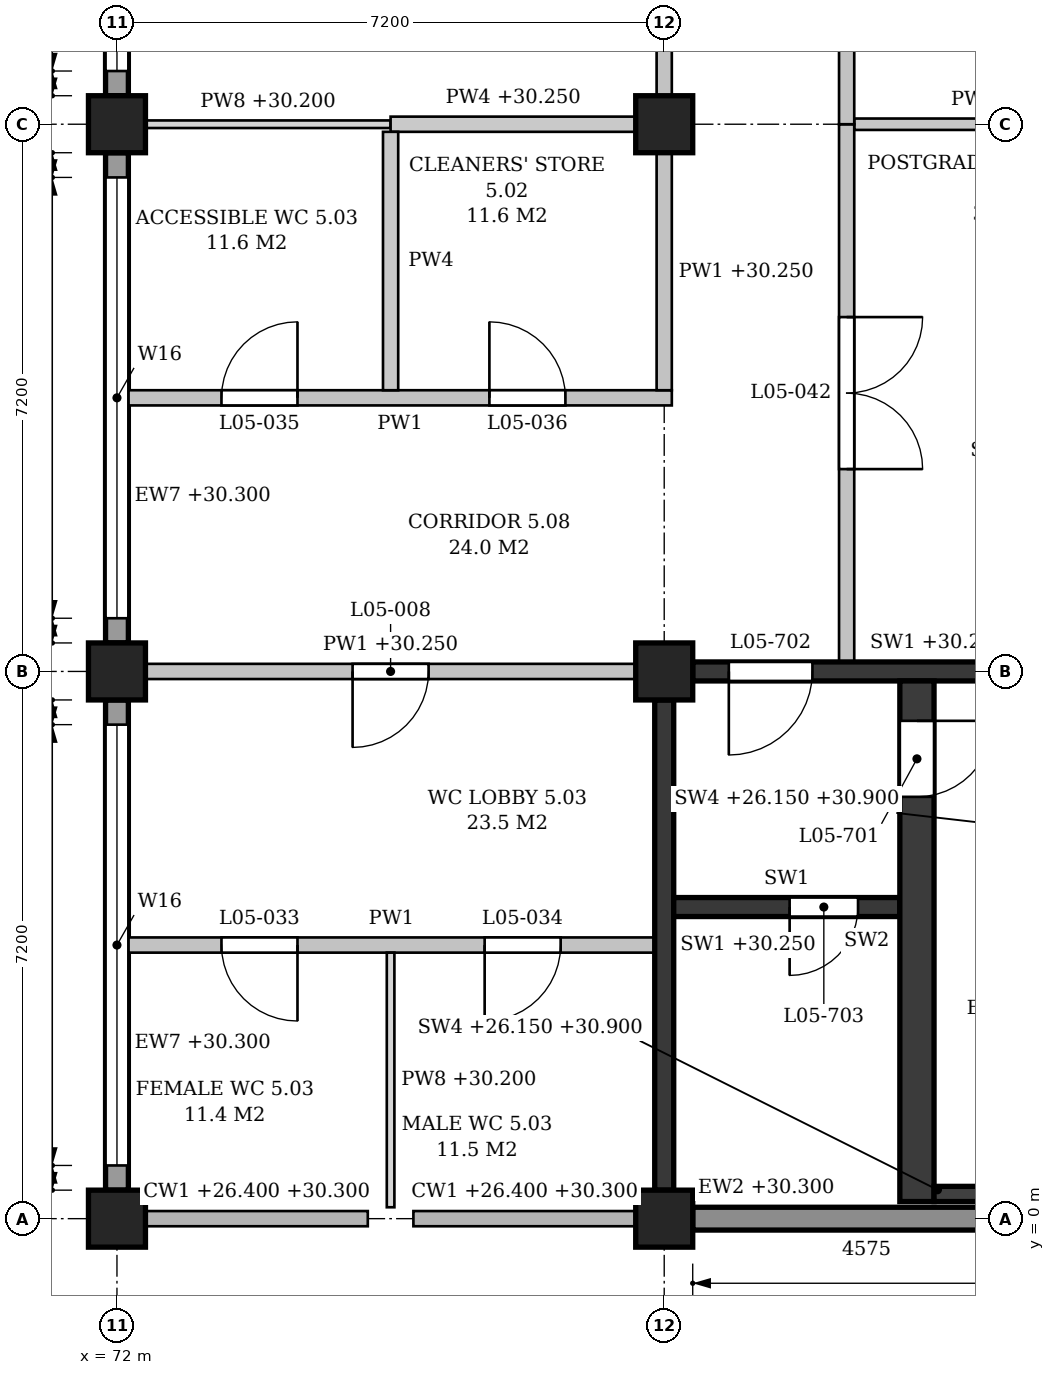
"""IFC4 building model, lengths in metres.
Left out: names, types, materials, properties, quantities, classifications, styles, units other than length and angle.
Written with IfcOpenShell. Run it as: python <this file> out.ifc"""

import sys

from ifc_helpers import new_model, si_unit, direction, frame, frame_2d, origin, origin_2d, place, context, subcontext, project, spatial, polyline, rectangle, outline, extrude, element, fill, save


model = new_model("IFC4")
c1 = context("Model", 3, precision=1e-05, world=origin(), true_north=direction((0.0, 1.0)))
c2 = subcontext(c1, "Body", "Model", "MODEL_VIEW")
j1 = project(units=[si_unit("LENGTHUNIT", "METRE"), si_unit("PLANEANGLEUNIT", "RADIAN")], contexts=[c1])
p1 = place(None, origin())
s1 = spatial("IfcSite", under=j1, at=p1, CompositionType="ELEMENT")
p2 = place(p1, origin())
s2 = spatial("IfcBuilding", under=s1, at=p2, CompositionType="ELEMENT")
p3 = place(p2, frame((0.0, 0.0, 26.4)))
s3 = spatial("IfcBuildingStorey", under=s2, at=p3, CompositionType="ELEMENT", Elevation=26.4)
for number, where, z_axis, x_axis in (
    (1, (72.0, 0.0, 0.0), (0.0, 0.0, 1.0), (1.0, 0.0, 0.0)),
    (2, (72.0, 7.2, 0.0), (0.0, 0.0, 1.0), (1.0, 0.0, 0.0)),
    (3, (72.0, 14.4, 0.0), (0.0, 0.0, 1.0), (1.0, 0.0, 0.0)),
    (4, (79.2, 0.0, 0.0), (0.0, 0.0, 1.0), (1.0, 0.0, 0.0)),
    (5, (79.2, 7.2, 0.0), (0.0, 0.0, 1.0), (1.0, 0.0, 0.0)),
    (6, (79.2, 14.4, 0.0), (0.0, 0.0, 1.0), (1.0, 0.0, 0.0)),
):
    element("IfcColumn", number, at=place(p3, frame(where, z_axis=z_axis, x_axis=x_axis)), inside=s3, PredefinedType="COLUMN", context=c2, shape_type="SweptSolid", body=[
        extrude(rectangle(XDim=0.75, YDim=0.75, at=origin_2d()), origin(), (0.0, 0.0, 1.0), 4.8),
    ])
p4 = place(p3, frame((79.575, 0.0, 0.0), z_axis=(0.0, 0.0, 1.0), x_axis=(1.0, 0.0, 0.0)))
e7 = element("IfcWall", 7, at=p4, inside=s3, PredefinedType="STANDARD", context=c2, shape_type="SweptSolid", body=[
    extrude(rectangle(XDim=6.45, YDim=0.3, at=frame_2d((3.225, 0.0))), origin(), (0.0, 0.0, 1.0), 3.9),
])
p5 = place(p4, frame((4.575, 0.0, 0.9)))
e8 = element("IfcOpeningElement", 8, at=p5, cuts=e7, PredefinedType="OPENING", context=c2, shape_type="SweptSolid", body=[
    extrude(outline(polyline([(0.0, 0.0), (0.9, 0.0), (0.9, 2.05), (0.45, 2.5), (0.0, 2.05), (0.0, 0.0)])), frame((0.0, 0.16, 0.0), z_axis=(0.0, -1.0, 0.0), x_axis=(1.0, 0.0, 0.0)), (0.0, 0.0, 1.0), 0.32),
])
p6 = place(p3, frame((72.0, 0.375, 0.0), z_axis=(0.0, 0.0, 1.0), x_axis=(0.0, 1.0, 0.0)))
e9 = element("IfcWall", 9, at=p6, inside=s3, PredefinedType="STANDARD", context=c2, shape_type="SweptSolid", body=[
    extrude(rectangle(XDim=6.45, YDim=0.3, at=frame_2d((3.225, 0.0))), origin(), (0.0, 0.0, 1.0), 3.9),
])
p7 = place(p6, frame((0.325, 0.0, 1.5)))
e10 = element("IfcOpeningElement", 10, at=p7, cuts=e9, PredefinedType="OPENING", context=c2, shape_type="SweptSolid", body=[
    extrude(outline(polyline([(0.0, 0.0), (5.8, 0.0), (5.8, 0.4), (2.9, 1.9), (0.0, 0.4), (0.0, 0.0)])), frame((0.0, 0.16, 0.0), z_axis=(0.0, -1.0, 0.0), x_axis=(1.0, 0.0, 0.0)), (0.0, 0.0, 1.0), 0.32),
])
p8 = place(p3, frame((72.0, 7.575, 0.0), z_axis=(0.0, 0.0, 1.0), x_axis=(0.0, 1.0, 0.0)))
e11 = element("IfcWall", 11, at=p8, inside=s3, PredefinedType="STANDARD", context=c2, shape_type="SweptSolid", body=[
    extrude(rectangle(XDim=6.45, YDim=0.3, at=frame_2d((3.225, 0.0))), origin(), (0.0, 0.0, 1.0), 3.9),
])
p9 = place(p8, frame((0.325, 0.0, 1.5)))
e12 = element("IfcOpeningElement", 12, at=p9, cuts=e11, PredefinedType="OPENING", context=c2, shape_type="SweptSolid", body=[
    extrude(outline(polyline([(0.0, 0.0), (5.8, 0.0), (5.8, 0.4), (2.9, 1.9), (0.0, 0.4), (0.0, 0.0)])), frame((0.0, 0.16, 0.0), z_axis=(0.0, -1.0, 0.0), x_axis=(1.0, 0.0, 0.0)), (0.0, 0.0, 1.0), 0.32),
])
p10 = place(p3, frame((72.0, 14.775, 0.0), z_axis=(0.0, 0.0, 1.0), x_axis=(0.0, 1.0, 0.0)))
e13 = element("IfcWall", 13, at=p10, inside=s3, PredefinedType="STANDARD", context=c2, shape_type="SweptSolid", body=[
    extrude(rectangle(XDim=6.45, YDim=0.3, at=frame_2d((3.225, 0.0))), origin(), (0.0, 0.0, 1.0), 3.9),
])
p11 = place(p10, frame((0.325, 0.0, 1.5)))
e14 = element("IfcOpeningElement", 14, at=p11, cuts=e13, PredefinedType="OPENING", context=c2, shape_type="SweptSolid", body=[
    extrude(outline(polyline([(0.0, 0.0), (5.8, 0.0), (5.8, 0.4), (2.9, 1.9), (0.0, 0.4), (0.0, 0.0)])), frame((0.0, 0.16, 0.0), z_axis=(0.0, -1.0, 0.0), x_axis=(1.0, 0.0, 0.0)), (0.0, 0.0, 1.0), 0.32),
])
p12 = place(p3, frame((79.575, 7.2, 0.0), z_axis=(0.0, 0.0, 1.0), x_axis=(1.0, 0.0, 0.0)))
e15 = element("IfcWall", 15, at=p12, inside=s3, PredefinedType="SHEAR", context=c2, shape_type="SweptSolid", body=[
    extrude(rectangle(XDim=6.45, YDim=0.25, at=frame_2d((3.225, 0.0))), origin(), (0.0, 0.0, 1.0), 3.85),
])
p13 = place(p12, frame((0.475, 0.0, 0.0)))
e16 = element("IfcOpeningElement", 16, at=p13, cuts=e15, PredefinedType="OPENING", context=c2, shape_type="SweptSolid", body=[
    extrude(rectangle(XDim=1.1, YDim=2.1, at=frame_2d((0.55, 1.05))), frame((0.0, 0.135, 0.0), z_axis=(0.0, -1.0, 0.0), x_axis=(1.0, 0.0, 0.0)), (0.0, 0.0, 1.0), 0.27),
])
p14 = place(p3, frame((79.2, 0.375, 0.0), z_axis=(0.0, 0.0, 1.0), x_axis=(0.0, 1.0, 0.0)))
e17 = element("IfcWall", 17, at=p14, inside=s3, PredefinedType="SHEAR", context=c2, shape_type="SweptSolid", body=[
    extrude(rectangle(XDim=6.45, YDim=0.25, at=frame_2d((3.225, 0.0))), origin(), (0.0, 0.0, 1.0), 3.85),
])
p15 = place(p3, frame((82.75, 0.325, -0.25), z_axis=(0.0, 0.0, 1.0), x_axis=(1.0, 0.0, 0.0)))
e18 = element("IfcWall", 18, at=p15, inside=s3, PredefinedType="SHEAR", context=c2, shape_type="SweptSolid", body=[
    extrude(rectangle(XDim=1.4, YDim=0.2, at=frame_2d((0.7, 0.0))), origin(), (0.0, 0.0, 1.0), 4.75),
])
p16 = place(p3, frame((82.525, 0.225, 0.0), z_axis=(0.0, 0.0, 1.0), x_axis=(0.0, 1.0, 0.0)))
e19 = element("IfcWall", 19, at=p16, inside=s3, PredefinedType="SHEAR", context=c2, shape_type="SweptSolid", body=[
    extrude(rectangle(XDim=6.85, YDim=0.45, at=frame_2d((3.425, 0.0))), origin(), (0.0, 0.0, 1.0), 4.5),
])
p17 = place(p16, frame((5.325, 0.0, 0.0)))
e20 = element("IfcOpeningElement", 20, at=p17, cuts=e19, PredefinedType="OPENING", context=c2, shape_type="SweptSolid", body=[
    extrude(rectangle(XDim=1.0, YDim=2.1, at=frame_2d((0.5, 1.05))), frame((0.0, 0.235, 0.0), z_axis=(0.0, -1.0, 0.0), x_axis=(1.0, 0.0, 0.0)), (0.0, 0.0, 1.0), 0.47),
])
p18 = place(p3, frame((79.325, 4.1, 0.0), z_axis=(0.0, 0.0, 1.0), x_axis=(1.0, 0.0, 0.0)))
e21 = element("IfcWall", 21, at=p18, inside=s3, PredefinedType="SHEAR", context=c2, shape_type="SweptSolid", body=[
    extrude(rectangle(XDim=2.975, YDim=0.25, at=frame_2d((1.488, 0.0))), origin(), (0.0, 0.0, 1.0), 4.5),
])
p19 = place(p18, frame((1.525, 0.0, 0.0)))
e22 = element("IfcOpeningElement", 22, at=p19, cuts=e21, PredefinedType="OPENING", context=c2, shape_type="SweptSolid", body=[
    extrude(rectangle(XDim=0.9, YDim=2.1, at=frame_2d((0.45, 1.05))), frame((0.0, 0.135, 0.0), z_axis=(0.0, -1.0, 0.0), x_axis=(1.0, 0.0, 0.0)), (0.0, 0.0, 1.0), 0.27),
])
p20 = place(p3, frame((72.15, 3.6, 0.0), z_axis=(0.0, 0.0, 1.0), x_axis=(1.0, 0.0, 0.0)))
e23 = element("IfcWall", 23, at=p20, inside=s3, PredefinedType="PARTITIONING", context=c2, shape_type="SweptSolid", body=[
    extrude(outline(polyline([(0.0, 0.0), (6.925, 0.0), (6.925, 3.85), (6.825, 3.85), (6.825, 4.5), (0.05, 4.5), (0.05, 3.9), (0.0, 3.9), (0.0, 0.0)])), frame((0.0, 0.1, 0.0), z_axis=(0.0, -1.0, 0.0), x_axis=(1.0, 0.0, 0.0)), (0.0, 0.0, 1.0), 0.2),
])
p21 = place(p20, frame((1.225, 0.0, 0.0)))
e24 = element("IfcOpeningElement", 24, at=p21, cuts=e23, PredefinedType="OPENING", context=c2, shape_type="SweptSolid", body=[
    extrude(rectangle(XDim=1.0, YDim=2.1, at=frame_2d((0.5, 1.05))), frame((0.0, 0.11, 0.0), z_axis=(0.0, -1.0, 0.0), x_axis=(1.0, 0.0, 0.0)), (0.0, 0.0, 1.0), 0.22),
])
p22 = place(p20, frame((4.688, 0.0, 0.0)))
e25 = element("IfcOpeningElement", 25, at=p22, cuts=e23, PredefinedType="OPENING", context=c2, shape_type="SweptSolid", body=[
    extrude(rectangle(XDim=1.0, YDim=2.1, at=frame_2d((0.5, 1.05))), frame((0.0, 0.11, 0.0), z_axis=(0.0, -1.0, 0.0), x_axis=(1.0, 0.0, 0.0)), (0.0, 0.0, 1.0), 0.22),
])
p23 = place(p3, frame((72.375, 7.2, 0.0), z_axis=(0.0, 0.0, 1.0), x_axis=(1.0, 0.0, 0.0)))
e26 = element("IfcWall", 26, at=p23, inside=s3, PredefinedType="PARTITIONING", context=c2, shape_type="SweptSolid", body=[
    extrude(rectangle(XDim=6.45, YDim=0.2, at=frame_2d((3.225, 0.0))), origin(), (0.0, 0.0, 1.0), 3.85),
])
p24 = place(p23, frame((2.725, 0.0, 0.0)))
e27 = element("IfcOpeningElement", 27, at=p24, cuts=e26, PredefinedType="OPENING", context=c2, shape_type="SweptSolid", body=[
    extrude(rectangle(XDim=1.0, YDim=2.1, at=frame_2d((0.5, 1.05))), frame((0.0, 0.11, 0.0), z_axis=(0.0, -1.0, 0.0), x_axis=(1.0, 0.0, 0.0)), (0.0, 0.0, 1.0), 0.22),
])
p25 = place(p3, frame((72.15, 10.8, 0.0), z_axis=(0.0, 0.0, 1.0), x_axis=(1.0, 0.0, 0.0)))
e28 = element("IfcWall", 28, at=p25, inside=s3, PredefinedType="PARTITIONING", context=c2, shape_type="SweptSolid", body=[
    extrude(outline(polyline([(0.0, 0.0), (7.15, 0.0), (7.15, 3.85), (6.825, 3.85), (6.825, 4.5), (0.05, 4.5), (0.05, 3.9), (0.0, 3.9), (0.0, 0.0)])), frame((0.0, 0.1, 0.0), z_axis=(0.0, -1.0, 0.0), x_axis=(1.0, 0.0, 0.0)), (0.0, 0.0, 1.0), 0.2),
])
p26 = place(p25, frame((1.225, 0.0, 0.0)))
e29 = element("IfcOpeningElement", 29, at=p26, cuts=e28, PredefinedType="OPENING", context=c2, shape_type="SweptSolid", body=[
    extrude(rectangle(XDim=1.0, YDim=2.1, at=frame_2d((0.5, 1.05))), frame((0.0, 0.11, 0.0), z_axis=(0.0, -1.0, 0.0), x_axis=(1.0, 0.0, 0.0)), (0.0, 0.0, 1.0), 0.22),
])
p27 = place(p25, frame((4.75, 0.0, 0.0)))
e30 = element("IfcOpeningElement", 30, at=p27, cuts=e28, PredefinedType="OPENING", context=c2, shape_type="SweptSolid", body=[
    extrude(rectangle(XDim=1.0, YDim=2.1, at=frame_2d((0.5, 1.05))), frame((0.0, 0.11, 0.0), z_axis=(0.0, -1.0, 0.0), x_axis=(1.0, 0.0, 0.0)), (0.0, 0.0, 1.0), 0.22),
])
p28 = place(p3, frame((72.375, 14.4, 0.0), z_axis=(0.0, 0.0, 1.0), x_axis=(1.0, 0.0, 0.0)))
e31 = element("IfcWall", 31, at=p28, inside=s3, PredefinedType="PARTITIONING", context=c2, shape_type="SweptSolid", body=[
    extrude(rectangle(XDim=3.225, YDim=0.1, at=frame_2d((1.613, 0.0))), origin(), (0.0, 0.0, 1.0), 3.8),
])
p29 = place(p3, frame((75.6, 14.4, 0.0), z_axis=(0.0, 0.0, 1.0), x_axis=(1.0, 0.0, 0.0)))
e32 = element("IfcWall", 32, at=p29, inside=s3, PredefinedType="PARTITIONING", context=c2, shape_type="SweptSolid", body=[
    extrude(rectangle(XDim=3.225, YDim=0.2, at=frame_2d((1.612, 0.0))), origin(), (0.0, 0.0, 1.0), 3.85),
])
p30 = place(p3, frame((81.7, 14.4, 0.0), z_axis=(0.0, 0.0, 1.0), x_axis=(1.0, 0.0, 0.0)))
e33 = element("IfcWall", 33, at=p30, inside=s3, PredefinedType="PARTITIONING", context=c2, shape_type="SweptSolid", body=[
    extrude(rectangle(XDim=4.325, YDim=0.15, at=frame_2d((2.163, 0.0))), origin(), (0.0, 0.0, 1.0), 3.8),
])
p31 = place(p3, frame((75.6, 0.15, 0.0), z_axis=(0.0, 0.0, 1.0), x_axis=(0.0, 1.0, 0.0)))
e34 = element("IfcWall", 34, at=p31, inside=s3, PredefinedType="PARTITIONING", context=c2, shape_type="SweptSolid", body=[
    extrude(rectangle(XDim=3.35, YDim=0.1, at=frame_2d((1.675, 0.0))), origin(), (0.0, 0.0, 1.0), 3.8),
])
p32 = place(p3, frame((75.6, 10.9, 0.0), z_axis=(0.0, 0.0, 1.0), x_axis=(0.0, 1.0, 0.0)))
e35 = element("IfcWall", 35, at=p32, inside=s3, PredefinedType="PARTITIONING", context=c2, shape_type="SweptSolid", body=[
    extrude(outline(polyline([(0.0, 0.0), (3.4, 0.0), (3.4, 3.85), (3.275, 3.85), (3.275, 4.5), (0.0, 4.5), (0.0, 0.0)])), frame((0.0, 0.1, 0.0), z_axis=(0.0, -1.0, 0.0), x_axis=(1.0, 0.0, 0.0)), (0.0, 0.0, 1.0), 0.2),
])
p33 = place(p3, frame((79.2, 10.9, 0.0), z_axis=(0.0, 0.0, 1.0), x_axis=(0.0, 1.0, 0.0)))
e36 = element("IfcWall", 36, at=p33, inside=s3, PredefinedType="PARTITIONING", context=c2, shape_type="SweptSolid", body=[
    extrude(rectangle(XDim=3.125, YDim=0.2, at=frame_2d((1.562, 0.0))), origin(), (0.0, 0.0, 1.0), 3.85),
])
p34 = place(p3, frame((79.2, 14.775, 0.0), z_axis=(0.0, 0.0, 1.0), x_axis=(0.0, 1.0, 0.0)))
e37 = element("IfcWall", 37, at=p34, inside=s3, PredefinedType="PARTITIONING", context=c2, shape_type="SweptSolid", body=[
    extrude(rectangle(XDim=6.45, YDim=0.2, at=frame_2d((3.225, 0.0))), origin(), (0.0, 0.0, 1.0), 3.85),
])
p35 = place(p34, frame((2.725, 0.0, 0.0)))
e38 = element("IfcOpeningElement", 38, at=p35, cuts=e37, PredefinedType="OPENING", context=c2, shape_type="SweptSolid", body=[
    extrude(rectangle(XDim=1.0, YDim=2.1, at=frame_2d((0.5, 1.05))), frame((0.0, 0.11, 0.0), z_axis=(0.0, -1.0, 0.0), x_axis=(1.0, 0.0, 0.0)), (0.0, 0.0, 1.0), 0.22),
])
p36 = place(p3, frame((81.6, 7.325, 0.0), z_axis=(0.0, 0.0, 1.0), x_axis=(0.0, 1.0, 0.0)))
e39 = element("IfcWall", 39, at=p36, inside=s3, PredefinedType="PARTITIONING", context=c2, shape_type="SweptSolid", body=[
    extrude(outline(polyline([(0.0, 0.0), (7.075, 0.0), (7.075, 3.85), (6.85, 3.85), (6.85, 4.5), (0.1, 4.5), (0.1, 3.85), (0.0, 3.85), (0.0, 0.0)])), frame((0.0, 0.1, 0.0), z_axis=(0.0, -1.0, 0.0), x_axis=(1.0, 0.0, 0.0)), (0.0, 0.0, 1.0), 0.2),
])
p37 = place(p36, frame((2.537, 0.0, 0.0)))
e40 = element("IfcOpeningElement", 40, at=p37, cuts=e39, PredefinedType="OPENING", context=c2, shape_type="SweptSolid", body=[
    extrude(rectangle(XDim=2.0, YDim=2.1, at=frame_2d((1.0, 1.05))), frame((0.0, 0.11, 0.0), z_axis=(0.0, -1.0, 0.0), x_axis=(1.0, 0.0, 0.0)), (0.0, 0.0, 1.0), 0.22),
])
p38 = place(p3, frame((81.6, 14.4, 0.0), z_axis=(0.0, 0.0, 1.0), x_axis=(0.0, 1.0, 0.0)))
e41 = element("IfcWall", 41, at=p38, inside=s3, PredefinedType="PARTITIONING", context=c2, shape_type="SweptSolid", body=[
    extrude(outline(polyline([(0.0, 0.0), (7.2, 0.0), (7.2, 3.85), (6.975, 3.85), (6.975, 4.5), (0.225, 4.5), (0.225, 3.85), (0.0, 3.85), (0.0, 0.0)])), frame((0.0, 0.1, 0.0), z_axis=(0.0, -1.0, 0.0), x_axis=(1.0, 0.0, 0.0)), (0.0, 0.0, 1.0), 0.2),
])
p39 = place(p38, frame((3.1, 0.0, 0.0)))
e42 = element("IfcOpeningElement", 42, at=p39, cuts=e41, PredefinedType="OPENING", context=c2, shape_type="SweptSolid", body=[
    extrude(rectangle(XDim=1.0, YDim=2.1, at=frame_2d((0.5, 1.05))), frame((0.0, 0.11, 0.0), z_axis=(0.0, -1.0, 0.0), x_axis=(1.0, 0.0, 0.0)), (0.0, 0.0, 1.0), 0.22),
])
p40 = place(p7, origin())
e43 = element("IfcWindow", 43, at=p40, inside=s3, PartitioningType="TRIPLE_PANEL_VERTICAL", PredefinedType="WINDOW", context=c2, shape_type="SweptSolid", body=[
    extrude(outline(polyline([(0.0, 0.0), (5.8, 0.0), (5.8, 0.4), (2.9, 1.9), (0.0, 0.4), (0.0, 0.0)])), frame((0.0, 0.03, 0.0), z_axis=(0.0, -1.0, 0.0), x_axis=(1.0, 0.0, 0.0)), (0.0, 0.0, 1.0), 0.06),
])
fill(e10, e43)
p41 = place(p9, origin())
e44 = element("IfcWindow", 44, at=p41, inside=s3, PartitioningType="TRIPLE_PANEL_VERTICAL", PredefinedType="WINDOW", context=c2, shape_type="SweptSolid", body=[
    extrude(outline(polyline([(0.0, 0.0), (5.8, 0.0), (5.8, 0.4), (2.9, 1.9), (0.0, 0.4), (0.0, 0.0)])), frame((0.0, 0.03, 0.0), z_axis=(0.0, -1.0, 0.0), x_axis=(1.0, 0.0, 0.0)), (0.0, 0.0, 1.0), 0.06),
])
fill(e12, e44)
p42 = place(p11, origin())
e45 = element("IfcWindow", 45, at=p42, inside=s3, PartitioningType="TRIPLE_PANEL_VERTICAL", PredefinedType="WINDOW", context=c2, shape_type="SweptSolid", body=[
    extrude(outline(polyline([(0.0, 0.0), (5.8, 0.0), (5.8, 0.4), (2.9, 1.9), (0.0, 0.4), (0.0, 0.0)])), frame((0.0, 0.03, 0.0), z_axis=(0.0, -1.0, 0.0), x_axis=(1.0, 0.0, 0.0)), (0.0, 0.0, 1.0), 0.06),
])
fill(e14, e45)
p43 = place(p17, frame((1.0, 0.0, 0.0), z_axis=(0.0, 0.0, 1.0), x_axis=(-1.0, 0.0, 0.0)))
e46 = element("IfcDoor", 46, at=p43, inside=s3, OperationType="SINGLE_SWING_LEFT", PredefinedType="DOOR", context=c2, shape_type="SweptSolid", body=[
    extrude(rectangle(XDim=1.0, YDim=2.1, at=frame_2d((0.5, 1.05))), frame((0.0, 0.025, 0.0), z_axis=(0.0, -1.0, 0.0), x_axis=(1.0, 0.0, 0.0)), (0.0, 0.0, 1.0), 0.05),
])
fill(e20, e46)
p44 = place(p13, frame((1.1, 0.0, 0.0), z_axis=(0.0, 0.0, 1.0), x_axis=(-1.0, 0.0, 0.0)))
e47 = element("IfcDoor", 47, at=p44, inside=s3, OperationType="SINGLE_SWING_RIGHT", PredefinedType="DOOR", context=c2, shape_type="SweptSolid", body=[
    extrude(rectangle(XDim=1.1, YDim=2.1, at=frame_2d((0.55, 1.05))), frame((0.0, 0.025, 0.0), z_axis=(0.0, -1.0, 0.0), x_axis=(1.0, 0.0, 0.0)), (0.0, 0.0, 1.0), 0.05),
])
fill(e16, e47)
p45 = place(p19, frame((0.9, 0.0, 0.0), z_axis=(0.0, 0.0, 1.0), x_axis=(-1.0, 0.0, 0.0)))
e48 = element("IfcDoor", 48, at=p45, inside=s3, OperationType="SINGLE_SWING_RIGHT", PredefinedType="DOOR", context=c2, shape_type="SweptSolid", body=[
    extrude(rectangle(XDim=0.9, YDim=2.1, at=frame_2d((0.45, 1.05))), frame((0.0, 0.025, 0.0), z_axis=(0.0, -1.0, 0.0), x_axis=(1.0, 0.0, 0.0)), (0.0, 0.0, 1.0), 0.05),
])
fill(e22, e48)
p46 = place(p24, frame((1.0, 0.0, 0.0), z_axis=(0.0, 0.0, 1.0), x_axis=(-1.0, 0.0, 0.0)))
e49 = element("IfcDoor", 49, at=p46, inside=s3, OperationType="SINGLE_SWING_RIGHT", PredefinedType="DOOR", context=c2, shape_type="SweptSolid", body=[
    extrude(rectangle(XDim=1.0, YDim=2.1, at=frame_2d((0.5, 1.05))), frame((0.0, 0.025, 0.0), z_axis=(0.0, -1.0, 0.0), x_axis=(1.0, 0.0, 0.0)), (0.0, 0.0, 1.0), 0.05),
])
fill(e27, e49)
p47 = place(p21, frame((1.0, 0.0, 0.0), z_axis=(0.0, 0.0, 1.0), x_axis=(-1.0, 0.0, 0.0)))
e50 = element("IfcDoor", 50, at=p47, inside=s3, OperationType="SINGLE_SWING_LEFT", PredefinedType="DOOR", context=c2, shape_type="SweptSolid", body=[
    extrude(rectangle(XDim=1.0, YDim=2.1, at=frame_2d((0.5, 1.05))), frame((0.0, 0.025, 0.0), z_axis=(0.0, -1.0, 0.0), x_axis=(1.0, 0.0, 0.0)), (0.0, 0.0, 1.0), 0.05),
])
fill(e24, e50)
p48 = place(p22, frame((1.0, 0.0, 0.0), z_axis=(0.0, 0.0, 1.0), x_axis=(-1.0, 0.0, 0.0)))
e51 = element("IfcDoor", 51, at=p48, inside=s3, OperationType="SINGLE_SWING_RIGHT", PredefinedType="DOOR", context=c2, shape_type="SweptSolid", body=[
    extrude(rectangle(XDim=1.0, YDim=2.1, at=frame_2d((0.5, 1.05))), frame((0.0, 0.025, 0.0), z_axis=(0.0, -1.0, 0.0), x_axis=(1.0, 0.0, 0.0)), (0.0, 0.0, 1.0), 0.05),
])
fill(e25, e51)
p49 = place(p26, origin())
e52 = element("IfcDoor", 52, at=p49, inside=s3, OperationType="SINGLE_SWING_RIGHT", PredefinedType="DOOR", context=c2, shape_type="SweptSolid", body=[
    extrude(rectangle(XDim=1.0, YDim=2.1, at=frame_2d((0.5, 1.05))), frame((0.0, 0.025, 0.0), z_axis=(0.0, -1.0, 0.0), x_axis=(1.0, 0.0, 0.0)), (0.0, 0.0, 1.0), 0.05),
])
fill(e29, e52)
p50 = place(p27, origin())
e53 = element("IfcDoor", 53, at=p50, inside=s3, OperationType="SINGLE_SWING_LEFT", PredefinedType="DOOR", context=c2, shape_type="SweptSolid", body=[
    extrude(rectangle(XDim=1.0, YDim=2.1, at=frame_2d((0.5, 1.05))), frame((0.0, 0.025, 0.0), z_axis=(0.0, -1.0, 0.0), x_axis=(1.0, 0.0, 0.0)), (0.0, 0.0, 1.0), 0.05),
])
fill(e30, e53)
p51 = place(p37, origin())
e54 = element("IfcDoor", 54, at=p51, inside=s3, OperationType="DOUBLE_DOOR_SINGLE_SWING", PredefinedType="DOOR", context=c2, shape_type="SweptSolid", body=[
    extrude(rectangle(XDim=2.0, YDim=2.1, at=frame_2d((1.0, 1.05))), frame((0.0, 0.025, 0.0), z_axis=(0.0, -1.0, 0.0), x_axis=(1.0, 0.0, 0.0)), (0.0, 0.0, 1.0), 0.05),
])
fill(e40, e54)
save(model, sys.argv[1])
